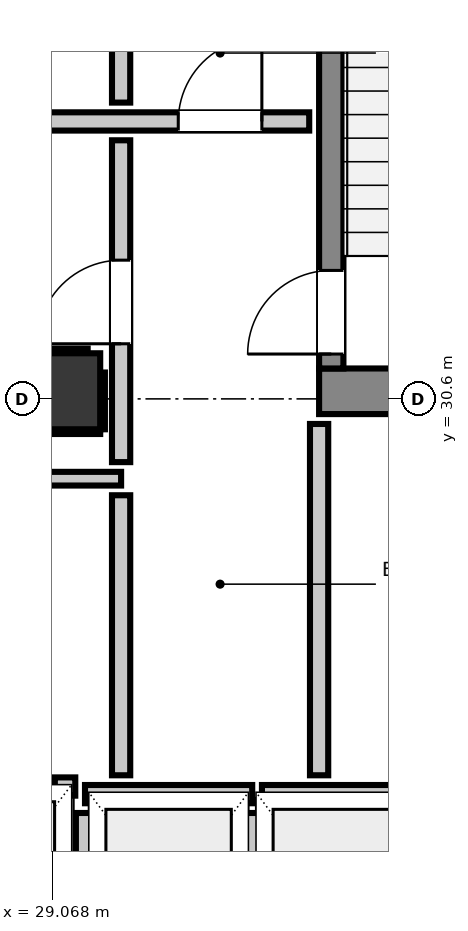
"""IFC4 building model, lengths in metres.
Left out: names, types, materials, properties, quantities, classifications, styles, units other than length and angle.
Written with IfcOpenShell. Run it as: python <this file> out.ifc"""

import sys

from ifc_helpers import new_model, si_unit, direction, frame, frame_2d, origin, origin_2d, place, context, subcontext, project, spatial, rectangle, extrude, element, fill, save


model = new_model("IFC4")
c1 = context("Model", 3, precision=1e-05, world=origin(), true_north=direction((0.0, 1.0)))
c2 = subcontext(c1, "Body", "Model", "MODEL_VIEW")
j1 = project(units=[si_unit("LENGTHUNIT", "METRE"), si_unit("PLANEANGLEUNIT", "RADIAN")], contexts=[c1])
p1 = place(None, origin())
s1 = spatial("IfcSite", under=j1, at=p1, CompositionType="ELEMENT")
p2 = place(p1, origin())
s2 = spatial("IfcBuilding", under=s1, at=p2, CompositionType="ELEMENT")
p3 = place(p2, frame((0.0, 0.0, 159.2)))
s3 = spatial("IfcBuildingStorey", under=s2, at=p3, CompositionType="ELEMENT", Elevation=159.2)
p4 = place(p3, frame((32.58, 30.7, 0.0), z_axis=(0.0, 0.0, 1.0), x_axis=(1.0, 0.0, 0.0)))
e1 = element("IfcWall", 1, at=p4, inside=s3, PredefinedType="SHEAR", context=c2, shape_type="SweptSolid", body=[
    extrude(rectangle(XDim=3.415, YDim=0.6, at=frame_2d((1.708, 0.0))), origin(), (0.0, 0.0, 1.0), 3.32),
])
p5 = place(p3, frame((32.74, 31.0, 0.0), z_axis=(0.0, 0.0, 1.0), x_axis=(0.0, 1.0, 0.0)))
e2 = element("IfcWall", 2, at=p5, inside=s3, PredefinedType="SHEAR", context=c2, shape_type="SweptSolid", body=[
    extrude(rectangle(XDim=7.8, YDim=0.32, at=frame_2d((3.9, 0.0))), origin(), (0.0, 0.0, 1.0), 3.32),
])
p6 = place(p5, frame((0.19, 0.0, 0.0)))
e3 = element("IfcOpeningElement", 3, at=p6, cuts=e2, PredefinedType="OPENING", context=c2, shape_type="SweptSolid", body=[
    extrude(rectangle(XDim=1.1, YDim=2.15, at=frame_2d((0.55, 1.075))), frame((0.0, 0.17, 0.0), z_axis=(0.0, -1.0, 0.0), x_axis=(1.0, 0.0, 0.0)), (0.0, 0.0, 1.0), 0.34),
])
p7 = place(p3, frame((29.2, 30.7, 0.0), z_axis=(0.0, 0.0, 1.0), x_axis=(1.0, 0.0, 0.0)))
e4 = element("IfcColumn", 4, at=p7, inside=s3, PredefinedType="COLUMN", context=c2, shape_type="SweptSolid", body=[
    extrude(rectangle(XDim=1.0, YDim=1.0, at=origin_2d()), origin(), (0.0, 0.0, 1.0), 3.32),
])
p8 = place(p3, frame((29.5, 25.4, 0.0), z_axis=(0.0, 0.0, 1.0), x_axis=(1.0, 0.0, 0.0)))
e5 = element("IfcWall", 5, at=p8, inside=s3, PredefinedType="PARTITIONING", context=c2, shape_type="SweptSolid", body=[
    extrude(rectangle(XDim=2.2, YDim=0.24, at=frame_2d((1.1, 0.0))), origin(), (0.0, 0.0, 1.0), 3.08),
])
p9 = place(p3, frame((29.5, 22.632, 0.0), z_axis=(0.0, 0.0, 1.0), x_axis=(0.0, 1.0, 0.0)))
e6 = element("IfcWall", 6, at=p9, inside=s3, PredefinedType="PARTITIONING", context=c2, shape_type="SweptSolid", body=[
    extrude(rectangle(XDim=2.52, YDim=0.24, at=frame_2d((1.26, 0.0))), origin(), (0.0, 0.0, 1.0), 2.315),
])
p10 = place(p3, frame((31.7, 22.63, 0.0), z_axis=(0.0, 0.0, 1.0), x_axis=(0.0, 1.0, 0.0)))
e7 = element("IfcWall", 7, at=p10, inside=s3, PredefinedType="PARTITIONING", context=c2, shape_type="SweptSolid", body=[
    extrude(rectangle(XDim=2.522, YDim=0.24, at=frame_2d((1.261, 0.0))), origin(), (0.0, 0.0, 1.0), 3.08),
])
p11 = place(p3, frame((31.828, 25.4, 0.0), z_axis=(0.0, 0.0, 1.0), x_axis=(1.0, 0.0, 0.0)))
e8 = element("IfcWall", 8, at=p11, inside=s3, PredefinedType="PARTITIONING", context=c2, shape_type="SweptSolid", body=[
    extrude(rectangle(XDim=2.072, YDim=0.24, at=frame_2d((1.036, 0.0))), origin(), (0.0, 0.0, 1.0), 3.08),
])
p12 = place(p3, frame((29.103, 25.5, 0.0), z_axis=(0.0, 0.0, 1.0), x_axis=(1.0, 0.0, 0.0)))
e9 = element("IfcWall", 9, at=p12, inside=s3, PredefinedType="PARTITIONING", context=c2, shape_type="SweptSolid", body=[
    extrude(rectangle(XDim=0.269, YDim=0.24, at=frame_2d((0.135, 0.0))), origin(), (0.0, 0.0, 1.0), 3.08),
])
p13 = place(p3, frame((28.702, 34.25, 0.0), z_axis=(0.0, 0.0, 1.0), x_axis=(1.0, 0.0, 0.0)))
e10 = element("IfcWall", 10, at=p13, inside=s3, PredefinedType="PARTITIONING", context=c2, shape_type="SweptSolid", body=[
    extrude(rectangle(XDim=3.748, YDim=0.24, at=frame_2d((1.874, 0.0))), origin(), (0.0, 0.0, 1.0), 3.08),
])
p14 = place(p13, frame((2.025, 0.0, 0.0)))
e11 = element("IfcOpeningElement", 11, at=p14, cuts=e10, PredefinedType="OPENING", context=c2, shape_type="SweptSolid", body=[
    extrude(rectangle(XDim=1.1, YDim=2.15, at=frame_2d((0.55, 1.075))), frame((0.0, 0.13, 0.0), z_axis=(0.0, -1.0, 0.0), x_axis=(1.0, 0.0, 0.0)), (0.0, 0.0, 1.0), 0.26),
])
p15 = place(p3, frame((20.65, 29.55, 0.0), z_axis=(0.0, 0.0, 1.0), x_axis=(1.0, 0.0, 0.0)))
e12 = element("IfcWall", 12, at=p15, inside=s3, PredefinedType="PARTITIONING", context=c2, shape_type="SweptSolid", body=[
    extrude(rectangle(XDim=9.325, YDim=0.18, at=frame_2d((4.663, 0.0))), origin(), (0.0, 0.0, 1.0), 3.08),
])
p16 = place(p3, frame((29.975, 25.648, 0.0), z_axis=(0.0, 0.0, 1.0), x_axis=(0.0, 1.0, 0.0)))
e13 = element("IfcWall", 13, at=p16, inside=s3, PredefinedType="PARTITIONING", context=c2, shape_type="SweptSolid", body=[
    extrude(rectangle(XDim=3.684, YDim=0.24, at=frame_2d((1.842, 0.0))), origin(), (0.0, 0.0, 1.0), 3.08),
])
p17 = place(p3, frame((29.975, 29.768, 0.0), z_axis=(0.0, 0.0, 1.0), x_axis=(0.0, 1.0, 0.0)))
e14 = element("IfcWall", 14, at=p17, inside=s3, PredefinedType="PARTITIONING", context=c2, shape_type="SweptSolid", body=[
    extrude(rectangle(XDim=4.234, YDim=0.24, at=frame_2d((2.117, 0.0))), origin(), (0.0, 0.0, 1.0), 3.08),
])
p18 = place(p17, frame((1.557, 0.0, 0.0)))
e15 = element("IfcOpeningElement", 15, at=p18, cuts=e14, PredefinedType="OPENING", context=c2, shape_type="SweptSolid", body=[
    extrude(rectangle(XDim=1.1, YDim=2.15, at=frame_2d((0.55, 1.075))), frame((0.0, 0.13, 0.0), z_axis=(0.0, -1.0, 0.0), x_axis=(1.0, 0.0, 0.0)), (0.0, 0.0, 1.0), 0.26),
])
p19 = place(p3, frame((29.975, 34.498, 0.0), z_axis=(0.0, 0.0, 1.0), x_axis=(0.0, 1.0, 0.0)))
e16 = element("IfcWall", 16, at=p19, inside=s3, PredefinedType="PARTITIONING", context=c2, shape_type="SweptSolid", body=[
    extrude(rectangle(XDim=0.924, YDim=0.24, at=frame_2d((0.462, 0.0))), origin(), (0.0, 0.0, 1.0), 3.08),
])
p20 = place(p3, frame((32.58, 25.648, 0.0), z_axis=(0.0, 0.0, 1.0), x_axis=(0.0, 1.0, 0.0)))
e17 = element("IfcWall", 17, at=p20, inside=s3, PredefinedType="PARTITIONING", context=c2, shape_type="SweptSolid", body=[
    extrude(rectangle(XDim=4.622, YDim=0.24, at=frame_2d((2.311, 0.0))), origin(), (0.0, 0.0, 1.0), 3.08),
])
p21 = place(p3, frame((28.7, 30.168, 0.0), z_axis=(0.0, 0.0, 1.0), x_axis=(1.0, 0.0, 0.0)))
e18 = element("IfcWall", 18, at=p21, inside=s3, PredefinedType="PARTITIONING", context=c2, shape_type="SweptSolid", body=[
    extrude(rectangle(XDim=1.0, YDim=0.06, at=frame_2d((0.5, 0.0))), origin(), (0.0, 0.0, 1.0), 1.45),
])
p22 = place(p3, frame((28.7, 31.232, 0.0), z_axis=(0.0, 0.0, 1.0), x_axis=(1.0, 0.0, 0.0)))
e19 = element("IfcWall", 19, at=p22, inside=s3, PredefinedType="PARTITIONING", context=c2, shape_type="SweptSolid", body=[
    extrude(rectangle(XDim=0.835, YDim=0.06, at=frame_2d((0.417, 0.0))), origin(), (0.0, 0.0, 1.0), 1.45),
])
p23 = place(p3, frame((29.732, 30.2, 0.0), z_axis=(0.0, 0.0, 1.0), x_axis=(0.0, 1.0, 0.0)))
e20 = element("IfcWall", 20, at=p23, inside=s3, PredefinedType="PARTITIONING", context=c2, shape_type="SweptSolid", body=[
    extrude(rectangle(XDim=0.747, YDim=0.06, at=frame_2d((0.374, 0.0))), origin(), (0.0, 0.0, 1.0), 1.45),
])
p24 = place(p6, origin())
e21 = element("IfcDoor", 21, at=p24, inside=s3, OperationType="SINGLE_SWING_LEFT", PredefinedType="DOOR", context=c2, shape_type="SweptSolid", body=[
    extrude(rectangle(XDim=1.1, YDim=2.15, at=frame_2d((0.55, 1.075))), frame((0.0, 0.025, 0.0), z_axis=(0.0, -1.0, 0.0), x_axis=(1.0, 0.0, 0.0)), (0.0, 0.0, 1.0), 0.05),
])
fill(e3, e21)
p25 = place(p18, origin())
e22 = element("IfcDoor", 22, at=p25, inside=s3, OperationType="SINGLE_SWING_LEFT", PredefinedType="DOOR", context=c2, shape_type="SweptSolid", body=[
    extrude(rectangle(XDim=1.1, YDim=2.15, at=frame_2d((0.55, 1.075))), frame((0.0, 0.025, 0.0), z_axis=(0.0, -1.0, 0.0), x_axis=(1.0, 0.0, 0.0)), (0.0, 0.0, 1.0), 0.05),
])
fill(e15, e22)
p26 = place(p14, origin())
e23 = element("IfcDoor", 23, at=p26, inside=s3, OperationType="SINGLE_SWING_RIGHT", PredefinedType="DOOR", context=c2, shape_type="SweptSolid", body=[
    extrude(rectangle(XDim=1.1, YDim=2.15, at=frame_2d((0.55, 1.075))), frame((0.0, 0.025, 0.0), z_axis=(0.0, -1.0, 0.0), x_axis=(1.0, 0.0, 0.0)), (0.0, 0.0, 1.0), 0.05),
])
fill(e11, e23)
save(model, sys.argv[1])
